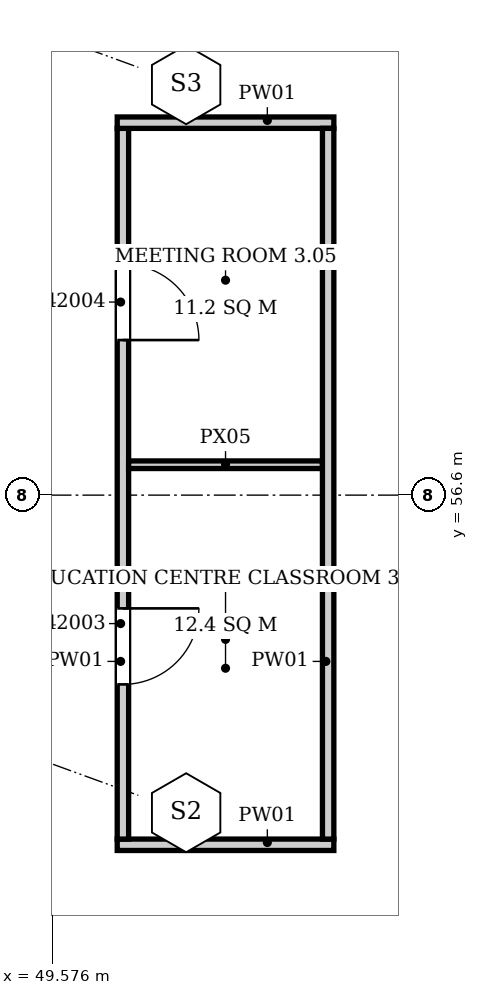
"""IFC4 building model, lengths in metres.
Left out: names, types, materials, properties, quantities, classifications, styles, units other than length and angle.
Written with IfcOpenShell. Run it as: python <this file> out.ifc"""

import sys

from ifc_helpers import new_model, si_unit, direction, frame, frame_2d, origin, place, context, subcontext, project, spatial, rectangle, extrude, element, fill, save


model = new_model("IFC4")
c1 = context("Model", 3, precision=1e-05, world=origin(), true_north=direction((0.0, 1.0)))
c2 = subcontext(c1, "Body", "Model", "MODEL_VIEW")
j1 = project(units=[si_unit("LENGTHUNIT", "METRE"), si_unit("PLANEANGLEUNIT", "RADIAN")], contexts=[c1])
p1 = place(None, origin())
s1 = spatial("IfcSite", under=j1, at=p1, CompositionType="ELEMENT")
p2 = place(p1, origin())
s2 = spatial("IfcBuilding", under=s1, at=p2, CompositionType="ELEMENT")
p3 = place(p2, frame((0.0, 0.0, 21.7)))
s3 = spatial("IfcBuildingStorey", under=s2, at=p3, CompositionType="ELEMENT", Elevation=21.7)
p4 = place(p3, frame((50.425, 52.0, 0.0), z_axis=(0.0, 0.0, 1.0), x_axis=(1.0, 0.0, 0.0)))
e1 = element("IfcWall", 1, at=p4, inside=s3, PredefinedType="PARTITIONING", context=c2, shape_type="SweptSolid", body=[
    extrude(rectangle(XDim=2.85, YDim=0.15, at=frame_2d((1.425, 0.0))), origin(), (0.0, 0.0, 1.0), 4.65),
])
p5 = place(p3, frame((50.5, 52.075, 0.0), z_axis=(0.0, 0.0, 1.0), x_axis=(0.0, 1.0, 0.0)))
e2 = element("IfcWall", 2, at=p5, inside=s3, PredefinedType="PARTITIONING", context=c2, shape_type="SweptSolid", body=[
    extrude(rectangle(XDim=9.35, YDim=0.15, at=frame_2d((4.675, 0.0))), origin(), (0.0, 0.0, 1.0), 4.65),
])
p6 = place(p5, frame((2.035, 0.0, 0.0)))
e3 = element("IfcOpeningElement", 3, at=p6, cuts=e2, PredefinedType="OPENING", context=c2, shape_type="SweptSolid", body=[
    extrude(rectangle(XDim=1.0, YDim=2.1, at=frame_2d((0.5, 1.05))), frame((0.0, 0.085, 0.0), z_axis=(0.0, -1.0, 0.0), x_axis=(1.0, 0.0, 0.0)), (0.0, 0.0, 1.0), 0.17),
])
p7 = place(p5, frame((6.565, 0.0, 0.0)))
e4 = element("IfcOpeningElement", 4, at=p7, cuts=e2, PredefinedType="OPENING", context=c2, shape_type="SweptSolid", body=[
    extrude(rectangle(XDim=1.0, YDim=2.1, at=frame_2d((0.5, 1.05))), frame((0.0, 0.085, 0.0), z_axis=(0.0, -1.0, 0.0), x_axis=(1.0, 0.0, 0.0)), (0.0, 0.0, 1.0), 0.17),
])
p8 = place(p3, frame((50.425, 61.5, 0.0), z_axis=(0.0, 0.0, 1.0), x_axis=(1.0, 0.0, 0.0)))
e5 = element("IfcWall", 5, at=p8, inside=s3, PredefinedType="PARTITIONING", context=c2, shape_type="SweptSolid", body=[
    extrude(rectangle(XDim=2.85, YDim=0.15, at=frame_2d((1.425, 0.0))), origin(), (0.0, 0.0, 1.0), 4.65),
])
p9 = place(p3, frame((50.575, 57.0, 0.0), z_axis=(0.0, 0.0, 1.0), x_axis=(1.0, 0.0, 0.0)))
e6 = element("IfcWall", 6, at=p9, inside=s3, PredefinedType="PARTITIONING", context=c2, shape_type="SweptSolid", body=[
    extrude(rectangle(XDim=2.55, YDim=0.1, at=frame_2d((1.275, 0.0))), origin(), (0.0, 0.0, 1.0), 4.25),
])
p10 = place(p3, frame((53.2, 52.075, 0.0), z_axis=(0.0, 0.0, 1.0), x_axis=(0.0, 1.0, 0.0)))
e7 = element("IfcWall", 7, at=p10, inside=s3, PredefinedType="PARTITIONING", context=c2, shape_type="SweptSolid", body=[
    extrude(rectangle(XDim=9.35, YDim=0.15, at=frame_2d((4.675, 0.0))), origin(), (0.0, 0.0, 1.0), 4.65),
])
p11 = place(p6, origin())
e8 = element("IfcDoor", 8, at=p11, inside=s3, OperationType="SINGLE_SWING_RIGHT", PredefinedType="DOOR", context=c2, shape_type="SweptSolid", body=[
    extrude(rectangle(XDim=1.0, YDim=2.1, at=frame_2d((0.5, 1.05))), frame((0.0, 0.025, 0.0), z_axis=(0.0, -1.0, 0.0), x_axis=(1.0, 0.0, 0.0)), (0.0, 0.0, 1.0), 0.05),
])
fill(e3, e8)
p12 = place(p7, origin())
e9 = element("IfcDoor", 9, at=p12, inside=s3, OperationType="SINGLE_SWING_LEFT", PredefinedType="DOOR", context=c2, shape_type="SweptSolid", body=[
    extrude(rectangle(XDim=1.0, YDim=2.1, at=frame_2d((0.5, 1.05))), frame((0.0, 0.025, 0.0), z_axis=(0.0, -1.0, 0.0), x_axis=(1.0, 0.0, 0.0)), (0.0, 0.0, 1.0), 0.05),
])
fill(e4, e9)
save(model, sys.argv[1])
